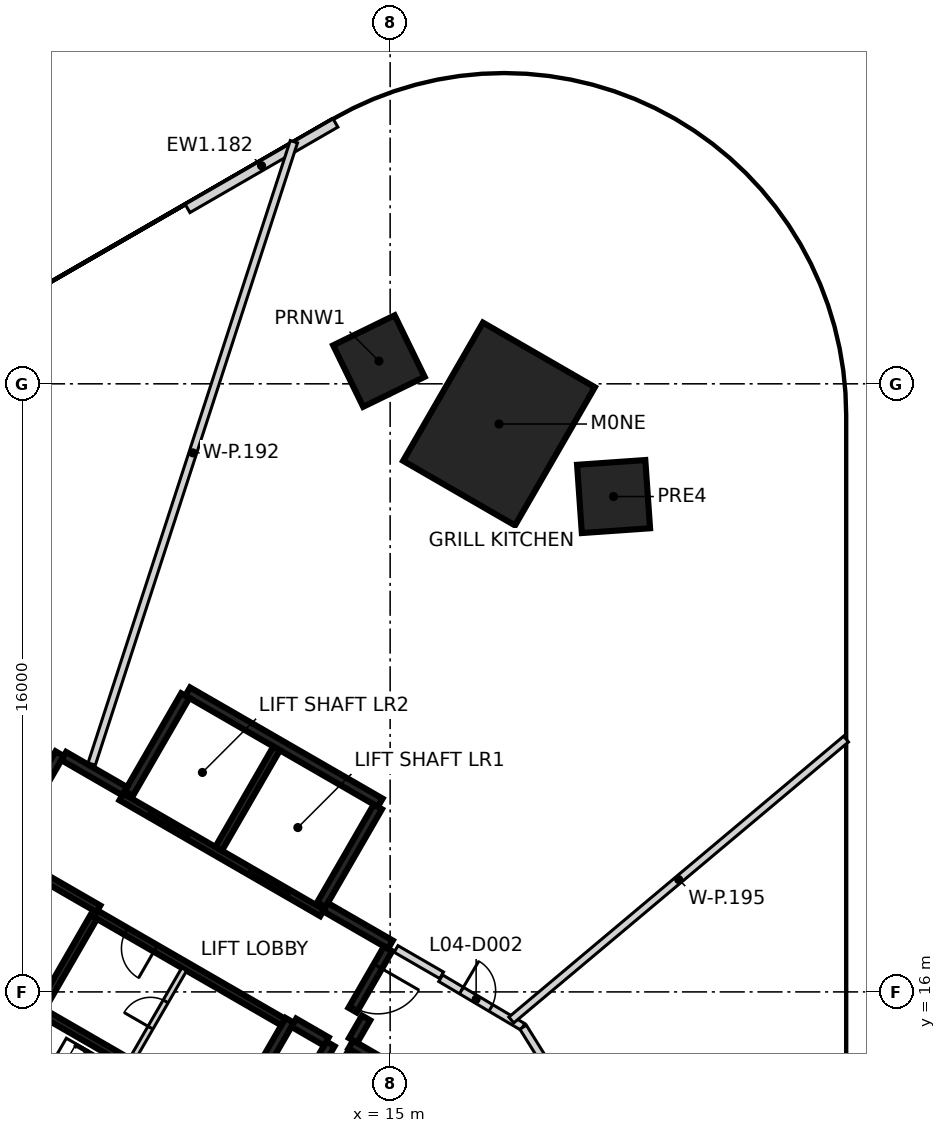
"""IFC4 building model, lengths in metres.
Left out: names, types, materials, properties, quantities, classifications, styles, units other than length and angle.
Written with IfcOpenShell. Run it as: python <this file> out.ifc"""

import sys

from ifc_helpers import new_model, si_unit, direction, frame, frame_2d, origin, origin_2d, place, context, subcontext, project, spatial, polyline, rectangle, outline, extrude, element, fill, save


model = new_model("IFC4")
c1 = context("Model", 3, precision=1e-05, world=origin(), true_north=direction((0.0, 1.0)))
c2 = subcontext(c1, "Body", "Model", "MODEL_VIEW")
j1 = project(units=[si_unit("LENGTHUNIT", "METRE"), si_unit("PLANEANGLEUNIT", "RADIAN")], contexts=[c1])
p1 = place(None, origin())
s1 = spatial("IfcSite", under=j1, at=p1, CompositionType="ELEMENT")
p2 = place(p1, origin())
s2 = spatial("IfcBuilding", under=s1, at=p2, CompositionType="ELEMENT")
p3 = place(p2, frame((0.0, 0.0, 24.5)))
s3 = spatial("IfcBuildingStorey", under=s2, at=p3, CompositionType="ELEMENT", Elevation=24.5)
p4 = place(p3, frame((17.865, 30.942, -0.45), z_axis=(0.0, 0.0, 1.0), x_axis=(0.5, 0.866025403784, 0.0)))
e1 = element("IfcColumn", 1, at=p4, inside=s3, PredefinedType="COLUMN", context=c2, shape_type="SweptSolid", body=[
    extrude(rectangle(XDim=4.2, YDim=3.4, at=origin_2d()), origin(), (0.0, 0.0, 1.0), 5.05),
])
for number, where, z_axis, x_axis in (
    (2, (20.879, 29.034, -0.45), (0.0, 0.0, 1.0), (0.998, 0.07, 0.0)),
    (3, (14.705, 32.599, -0.45), (0.0, 0.0, 1.0), (-0.438, 0.899, 0.0)),
):
    element("IfcColumn", number, at=place(p3, frame(where, z_axis=z_axis, x_axis=x_axis)), inside=s3, PredefinedType="COLUMN", context=c2, shape_type="SweptSolid", body=[
        extrude(rectangle(XDim=1.8, YDim=1.8, at=origin_2d()), origin(), (0.0, 0.0, 1.0), 5.05),
    ])
p5 = place(p3, frame((9.67, 36.614, 0.0), z_axis=(0.0, 0.0, 1.0), x_axis=(0.865880754896, 0.500250455572, 0.0)))
e4 = element("IfcWall", 4, at=p5, inside=s3, PredefinedType="SOLIDWALL", context=c2, shape_type="SweptSolid", body=[
    extrude(rectangle(XDim=4.496, YDim=0.25, at=frame_2d((2.248, 0.0))), origin(), (0.0, 0.0, 1.0), 4.6),
])
p6 = place(p3, origin())
e5 = element("IfcWall", 5, at=p6, inside=s3, PredefinedType="SOLIDWALL", context=c2, shape_type="SweptSolid", body=[
    extrude(outline(polyline([(26.981, 31.766), (26.827, 32.933), (26.522, 34.07), (26.072, 35.157), (25.483, 36.177), (24.767, 37.111), (23.934, 37.943), (23.0, 38.66), (21.981, 39.249), (20.893, 39.699), (19.756, 40.004), (19.175, 40.1), (18.0, 40.177), (16.825, 40.1), (15.671, 39.87), (14.556, 39.492), (13.5, 38.971), (13.611, 38.747), (14.652, 39.26), (15.735, 39.628), (16.858, 39.852), (18.0, 39.926), (19.146, 39.851), (19.703, 39.759), (20.812, 39.462), (21.87, 39.024), (22.861, 38.452), (23.769, 37.755), (24.578, 36.946), (25.275, 36.038), (25.847, 35.047), (26.285, 33.989), (26.581, 32.884), (26.733, 31.733), (26.981, 31.766)])), origin(), (0.0, 0.0, 1.0), 4.6),
])
p7 = place(p3, frame((3.179, 16.856, 0.0), z_axis=(0.0, 0.0, 1.0), x_axis=(0.500004234368, 0.866022959057, 0.0)))
e6 = element("IfcWall", 6, at=p7, inside=s3, PredefinedType="SHEAR", context=c2, shape_type="SweptSolid", body=[
    extrude(rectangle(XDim=6.25, YDim=0.25, at=frame_2d((3.125, 0.0))), origin(), (0.0, 0.0, 1.0), 4.6),
])
p8 = place(p3, frame((9.673, 23.903, 0.0), z_axis=(0.0, 0.0, 1.0), x_axis=(0.86603616409, -0.499981362141, 0.0)))
e7 = element("IfcWall", 7, at=p8, inside=s3, PredefinedType="SHEAR", context=c2, shape_type="SweptSolid", body=[
    extrude(rectangle(XDim=5.85, YDim=0.25, at=frame_2d((2.925, 0.0))), origin(), (0.0, 0.0, 1.0), 4.6),
])
p9 = place(p3, frame((12.357, 15.252, 0.0), z_axis=(0.0, 0.0, 1.0), x_axis=(-0.500028443584, -0.866008981251, 0.0)))
e8 = element("IfcWall", 8, at=p9, inside=s3, PredefinedType="SHEAR", context=c2, shape_type="SweptSolid", body=[
    extrude(rectangle(XDim=3.2, YDim=0.25, at=frame_2d((1.6, 0.0))), origin(), (0.0, 0.0, 1.0), 4.6),
])
for number, where, z_axis, x_axis in (
    (9, (8.123, 21.219, 0.0), (0.0, 0.0, 1.0), (0.5, 0.866, 0.0)),
    (10, (14.676, 20.87, 0.0), (0.0, 0.0, 1.0), (-0.5, -0.866, 0.0)),
):
    element("IfcWall", number, at=place(p3, frame(where, z_axis=z_axis, x_axis=x_axis)), inside=s3, PredefinedType="SHEAR", context=c2, shape_type="SweptSolid", body=[
        extrude(rectangle(XDim=2.975, YDim=0.25, at=frame_2d((1.487, 0.0))), origin(), (0.0, 0.0, 1.0), 4.6),
    ])
p10 = place(p3, frame((13.963, 14.614, 0.0), z_axis=(0.0, 0.0, 1.0), x_axis=(0.866042235819, -0.499970844928, 0.0)))
e11 = element("IfcWall", 11, at=p10, inside=s3, PredefinedType="SHEAR", context=c2, shape_type="SweptSolid", body=[
    extrude(rectangle(XDim=2.865, YDim=0.25, at=frame_2d((1.432, 0.0))), origin(), (0.0, 0.0, 1.0), 4.6),
])
p11 = place(p3, frame((11.888, 11.961, 0.0), z_axis=(0.0, 0.0, 1.0), x_axis=(0.500003324108, 0.866023484601, 0.0)))
e12 = element("IfcWall", 12, at=p11, inside=s3, PredefinedType="SHEAR", context=c2, shape_type="SweptSolid", body=[
    extrude(rectangle(XDim=3.085, YDim=0.25, at=frame_2d((1.542, 0.0))), origin(), (0.0, 0.0, 1.0), 4.6),
])
p12 = place(p3, frame((13.297, 18.231, 0.0), z_axis=(0.0, 0.0, 1.0), x_axis=(0.866043531843, -0.499968599967, 0.0)))
e13 = element("IfcWall", 13, at=p12, inside=s3, PredefinedType="SHEAR", context=c2, shape_type="SweptSolid", body=[
    extrude(rectangle(XDim=1.975, YDim=0.25, at=frame_2d((0.987, 0.0))), origin(), (0.0, 0.0, 1.0), 4.6),
])
p13 = place(p3, frame((6.413, 22.206, 0.0), z_axis=(0.0, 0.0, 1.0), x_axis=(0.866016279763, -0.500015802937, 0.0)))
e14 = element("IfcWall", 14, at=p13, inside=s3, PredefinedType="SHEAR", context=c2, shape_type="SweptSolid", body=[
    extrude(rectangle(XDim=1.849, YDim=0.25, at=frame_2d((0.925, 0.0))), origin(), (0.0, 0.0, 1.0), 4.6),
])
p14 = place(p3, frame((14.945, 17.135, 0.0), z_axis=(0.0, 0.0, 1.0), x_axis=(-0.499983108224, -0.866035156036, 0.0)))
e15 = element("IfcWall", 15, at=p14, inside=s3, PredefinedType="SHEAR", context=c2, shape_type="SweptSolid", body=[
    extrude(rectangle(XDim=1.865, YDim=0.25, at=frame_2d((0.932, 0.0))), origin(), (0.0, 0.0, 1.0), 4.6),
])
p15 = place(p14, frame((0.535, 0.0, 0.0)))
e16 = element("IfcOpeningElement", 16, at=p15, cuts=e15, PredefinedType="OPENING", context=c2, shape_type="SweptSolid", body=[
    extrude(rectangle(XDim=1.25, YDim=2.1, at=frame_2d((0.625, 1.05))), frame((0.0, 0.135, 0.0), z_axis=(0.0, -1.0, 0.0), x_axis=(1.0, 0.0, 0.0)), (0.0, 0.0, 1.0), 0.27),
])
p16 = place(p3, frame((13.322, 14.695, 0.0), z_axis=(0.0, 0.0, 1.0), x_axis=(-0.866017078145, 0.500014420154, 0.0)))
e17 = element("IfcWall", 17, at=p16, inside=s3, PredefinedType="SHEAR", context=c2, shape_type="SweptSolid", body=[
    extrude(rectangle(XDim=0.989, YDim=0.25, at=frame_2d((0.495, 0.0))), origin(), (0.0, 0.0, 1.0), 4.6),
])
p17 = place(p3, frame((14.368, 15.315, 0.0), z_axis=(0.0, 0.0, 1.0), x_axis=(-0.499897359611, -0.866084655132, 0.0)))
e18 = element("IfcWall", 18, at=p17, inside=s3, PredefinedType="SHEAR", context=c2, shape_type="SweptSolid", body=[
    extrude(rectangle(XDim=0.685, YDim=0.25, at=frame_2d((0.342, 0.0))), origin(), (0.0, 0.0, 1.0), 4.6),
])
p18 = place(p3, frame((13.21, 18.08, 0.0), z_axis=(0.0, 0.0, 1.0), x_axis=(-0.866030299012, 0.499991521122, 0.0)))
e19 = element("IfcWall", 19, at=p18, inside=s3, PredefinedType="SHEAR", context=c2, shape_type="SweptSolid", body=[
    extrude(rectangle(XDim=6.1, YDim=0.2, at=frame_2d((3.05, 0.0))), origin(), (0.0, 0.0, 1.0), 4.6),
])
p19 = place(p18, frame((1.0, 0.0, 0.0)))
e20 = element("IfcOpeningElement", 20, at=p19, cuts=e19, PredefinedType="OPENING", context=c2, shape_type="SweptSolid", body=[
    extrude(rectangle(XDim=1.2, YDim=2.1, at=frame_2d((0.6, 1.05))), frame((0.0, 0.11, 0.0), z_axis=(0.0, -1.0, 0.0), x_axis=(1.0, 0.0, 0.0)), (0.0, 0.0, 1.0), 0.22),
])
p20 = place(p18, frame((4.05, 0.0, 0.0)))
e21 = element("IfcOpeningElement", 21, at=p20, cuts=e19, PredefinedType="OPENING", context=c2, shape_type="SweptSolid", body=[
    extrude(rectangle(XDim=1.2, YDim=2.1, at=frame_2d((0.6, 1.05))), frame((0.0, 0.11, 0.0), z_axis=(0.0, -1.0, 0.0), x_axis=(1.0, 0.0, 0.0)), (0.0, 0.0, 1.0), 0.22),
])
p21 = place(p3, frame((5.775, 15.502, 0.0), z_axis=(0.0, 0.0, 1.0), x_axis=(0.866020080793, -0.500009219579, 0.0)))
e22 = element("IfcWall", 22, at=p21, inside=s3, PredefinedType="SHEAR", context=c2, shape_type="SweptSolid", body=[
    extrude(rectangle(XDim=5.699, YDim=0.2, at=frame_2d((2.85, 0.0))), origin(), (0.0, 0.0, 1.0), 4.6),
])
p22 = place(p3, frame((12.185, 15.207, 0.0), z_axis=(0.0, 0.0, 1.0), x_axis=(-0.866020080793, 0.500009219579, 0.0)))
e23 = element("IfcWall", 23, at=p22, inside=s3, PredefinedType="SHEAR", context=c2, shape_type="SweptSolid", body=[
    extrude(rectangle(XDim=5.699, YDim=0.2, at=frame_2d((2.85, 0.0))), origin(), (0.0, 0.0, 1.0), 4.6),
])
p23 = place(p22, frame((3.874, 0.0, 0.0)))
e24 = element("IfcOpeningElement", 24, at=p23, cuts=e23, PredefinedType="OPENING", context=c2, shape_type="SweptSolid", body=[
    extrude(rectangle(XDim=0.9, YDim=2.1, at=frame_2d((0.45, 1.05))), frame((0.0, 0.11, 0.0), z_axis=(0.0, -1.0, 0.0), x_axis=(1.0, 0.0, 0.0)), (0.0, 0.0, 1.0), 0.22),
])
p24 = place(p3, frame((10.489, 19.767, 0.0), z_axis=(0.0, 0.0, 1.0), x_axis=(0.499946628782, 0.866056215479, 0.0)))
e25 = element("IfcWall", 25, at=p24, inside=s3, PredefinedType="SHEAR", context=c2, shape_type="SweptSolid", body=[
    extrude(rectangle(XDim=3.048, YDim=0.2, at=frame_2d((1.524, 0.0))), origin(), (0.0, 0.0, 1.0), 4.6),
])
p25 = place(p3, frame((14.008, 14.442, 0.0), z_axis=(0.0, 0.0, 1.0), x_axis=(-0.499986818241, -0.866033014143, 0.0)))
e26 = element("IfcWall", 26, at=p25, inside=s3, PredefinedType="SHEAR", context=c2, shape_type="SweptSolid", body=[
    extrude(rectangle(XDim=2.798, YDim=0.2, at=frame_2d((1.399, 0.0))), origin(), (0.0, 0.0, 1.0), 4.6),
])
p26 = place(p25, frame((0.949, 0.0, 0.0)))
e27 = element("IfcOpeningElement", 27, at=p26, cuts=e26, PredefinedType="OPENING", context=c2, shape_type="SweptSolid", body=[
    extrude(rectangle(XDim=0.9, YDim=2.1, at=frame_2d((0.45, 1.05))), frame((0.0, 0.11, 0.0), z_axis=(0.0, -1.0, 0.0), x_axis=(1.0, 0.0, 0.0)), (0.0, 0.0, 1.0), 0.22),
])
p27 = place(p3, frame((7.199, 17.97, 0.0), z_axis=(0.0, 0.0, 1.0), x_axis=(-0.499968400327, -0.866043647095, 0.0)))
e28 = element("IfcWall", 28, at=p27, inside=s3, PredefinedType="SHEAR", context=c2, shape_type="SweptSolid", body=[
    extrude(rectangle(XDim=2.75, YDim=0.2, at=frame_2d((1.375, 0.0))), origin(), (0.0, 0.0, 1.0), 4.6),
])
p28 = place(p3, frame((4.901, 19.586, 0.0), z_axis=(0.0, 0.0, 1.0), x_axis=(0.866022890907, -0.500004352405, 0.0)))
e29 = element("IfcWall", 29, at=p28, inside=s3, PredefinedType="SHEAR", context=c2, shape_type="SweptSolid", body=[
    extrude(rectangle(XDim=2.799, YDim=0.2, at=frame_2d((1.399, 0.0))), origin(), (0.0, 0.0, 1.0), 4.6),
])
p29 = place(p3, frame((8.207, 14.214, 0.0), z_axis=(0.0, 0.0, 1.0), x_axis=(0.499922376475, 0.866070215109, 0.0)))
e30 = element("IfcWall", 30, at=p29, inside=s3, PredefinedType="PARTITIONING", context=c2, shape_type="SweptSolid", body=[
    extrude(rectangle(XDim=2.749, YDim=0.15, at=frame_2d((1.374, 0.0))), origin(), (0.0, 0.0, 1.0), 4.6),
])
p30 = place(p29, frame((0.974, 0.0, 0.0)))
e31 = element("IfcOpeningElement", 31, at=p30, cuts=e30, PredefinedType="OPENING", context=c2, shape_type="SweptSolid", body=[
    extrude(rectangle(XDim=0.8, YDim=2.1, at=frame_2d((0.4, 1.05))), frame((0.0, 0.085, 0.0), z_axis=(0.0, -1.0, 0.0), x_axis=(1.0, 0.0, 0.0)), (0.0, 0.0, 1.0), 0.17),
])
p31 = place(p3, frame((15.156, 17.131, 0.0), z_axis=(0.0, 0.0, 1.0), x_axis=(0.865639364436, -0.500668044455, 0.0)))
e32 = element("IfcWall", 32, at=p31, inside=s3, PredefinedType="PARTITIONING", context=c2, shape_type="SweptSolid", body=[
    extrude(rectangle(XDim=1.385, YDim=0.2, at=frame_2d((0.693, 0.0))), origin(), (0.0, 0.0, 1.0), 4.6),
])
p32 = place(p3, frame((16.33, 16.36, 0.0), z_axis=(0.0, 0.0, 1.0), x_axis=(0.860403612142, -0.5096132104, 0.0)))
e33 = element("IfcWall", 33, at=p32, inside=s3, PredefinedType="PARTITIONING", context=c2, shape_type="SweptSolid", body=[
    extrude(rectangle(XDim=2.512, YDim=0.2, at=frame_2d((1.256, 0.0))), origin(), (0.0, 0.0, 1.0), 4.6),
])
p33 = place(p32, frame((0.635, 0.0, 0.0)))
e34 = element("IfcOpeningElement", 34, at=p33, cuts=e33, PredefinedType="OPENING", context=c2, shape_type="SweptSolid", body=[
    extrude(rectangle(XDim=0.9, YDim=2.1, at=frame_2d((0.45, 1.05))), frame((0.0, 0.11, 0.0), z_axis=(0.0, -1.0, 0.0), x_axis=(1.0, 0.0, 0.0)), (0.0, 0.0, 1.0), 0.22),
])
p34 = place(p3, frame((18.499, 15.072, 0.0), z_axis=(0.0, 0.0, 1.0), x_axis=(0.528576945796, -0.848885394133, 0.0)))
e35 = element("IfcWall", 35, at=p34, inside=s3, PredefinedType="PARTITIONING", context=c2, shape_type="SweptSolid", body=[
    extrude(rectangle(XDim=1.436, YDim=0.2, at=frame_2d((0.718, 0.0))), origin(), (0.0, 0.0, 1.0), 4.6),
])
p35 = place(p3, frame((7.147, 21.996, 0.0), z_axis=(0.0, 0.0, 1.0), x_axis=(0.309008482175, 0.951059282035, 0.0)))
e36 = element("IfcWall", 36, at=p35, inside=s3, PredefinedType="PARTITIONING", context=c2, shape_type="SweptSolid", body=[
    extrude(rectangle(XDim=17.218, YDim=0.2, at=frame_2d((8.609, 0.0))), origin(), (0.0, 0.0, 1.0), 4.6),
])
p36 = place(p3, frame((18.188, 15.261, 0.0), z_axis=(0.0, 0.0, 1.0), x_axis=(0.766013459385, 0.642824532855, 0.0)))
e37 = element("IfcWall", 37, at=p36, inside=s3, PredefinedType="PARTITIONING", context=c2, shape_type="SweptSolid", body=[
    extrude(rectangle(XDim=11.499, YDim=0.2, at=frame_2d((5.749, 0.0))), origin(), (0.0, 0.0, 1.0), 4.6),
])
p37 = place(p19, origin())
e38 = element("IfcDoor", 38, at=p37, inside=s3, OperationType="DOUBLE_DOOR_SLIDING", PredefinedType="DOOR", context=c2, shape_type="SweptSolid", body=[
    extrude(rectangle(XDim=1.2, YDim=2.1, at=frame_2d((0.6, 1.05))), frame((0.0, 0.025, 0.0), z_axis=(0.0, -1.0, 0.0), x_axis=(1.0, 0.0, 0.0)), (0.0, 0.0, 1.0), 0.05),
])
fill(e20, e38)
p38 = place(p20, origin())
e39 = element("IfcDoor", 39, at=p38, inside=s3, OperationType="DOUBLE_DOOR_SLIDING", PredefinedType="DOOR", context=c2, shape_type="SweptSolid", body=[
    extrude(rectangle(XDim=1.2, YDim=2.1, at=frame_2d((0.6, 1.05))), frame((0.0, 0.025, 0.0), z_axis=(0.0, -1.0, 0.0), x_axis=(1.0, 0.0, 0.0)), (0.0, 0.0, 1.0), 0.05),
])
fill(e21, e39)
p39 = place(p15, origin())
e40 = element("IfcDoor", 40, at=p39, inside=s3, OperationType="SINGLE_SWING_LEFT", PredefinedType="DOOR", context=c2, shape_type="SweptSolid", body=[
    extrude(rectangle(XDim=1.25, YDim=2.1, at=frame_2d((0.625, 1.05))), frame((0.0, 0.025, 0.0), z_axis=(0.0, -1.0, 0.0), x_axis=(1.0, 0.0, 0.0)), (0.0, 0.0, 1.0), 0.05),
])
fill(e16, e40)
p40 = place(p23, origin())
e41 = element("IfcDoor", 41, at=p40, inside=s3, OperationType="SINGLE_SWING_RIGHT", PredefinedType="DOOR", context=c2, shape_type="SweptSolid", body=[
    extrude(rectangle(XDim=0.9, YDim=2.1, at=frame_2d((0.45, 1.05))), frame((0.0, 0.025, 0.0), z_axis=(0.0, -1.0, 0.0), x_axis=(1.0, 0.0, 0.0)), (0.0, 0.0, 1.0), 0.05),
])
fill(e24, e41)
p41 = place(p30, origin())
e42 = element("IfcDoor", 42, at=p41, inside=s3, OperationType="SINGLE_SWING_RIGHT", PredefinedType="DOOR", context=c2, shape_type="SweptSolid", body=[
    extrude(rectangle(XDim=0.8, YDim=2.1, at=frame_2d((0.4, 1.05))), frame((0.0, 0.025, 0.0), z_axis=(0.0, -1.0, 0.0), x_axis=(1.0, 0.0, 0.0)), (0.0, 0.0, 1.0), 0.05),
])
fill(e31, e42)
p42 = place(p33, origin())
e43 = element("IfcDoor", 43, at=p42, inside=s3, OperationType="SINGLE_SWING_LEFT", PredefinedType="DOOR", context=c2, shape_type="SweptSolid", body=[
    extrude(rectangle(XDim=0.9, YDim=2.1, at=frame_2d((0.45, 1.05))), frame((0.0, 0.025, 0.0), z_axis=(0.0, -1.0, 0.0), x_axis=(1.0, 0.0, 0.0)), (0.0, 0.0, 1.0), 0.05),
])
fill(e34, e43)
save(model, sys.argv[1])
